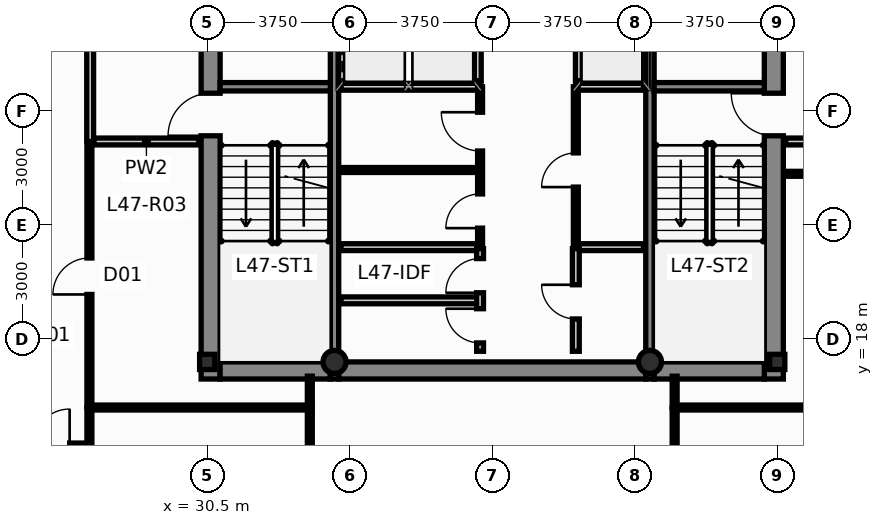
"""IFC4 building model, lengths in metres.
Left out: names, types, materials, properties, quantities, classifications, styles, units other than length and angle.
Written with IfcOpenShell. Run it as: python <this file> out.ifc"""

import sys

from ifc_helpers import new_model, si_unit, direction, frame, frame_2d, origin, origin_2d, place, context, subcontext, project, spatial, rectangle, hollow_circle, i_section, extrude, source, transform, mapped, element, fill, save


model = new_model("IFC4")
c1 = context("Model", 3, precision=1e-05, world=origin(), true_north=direction((0.0, 1.0)))
c2 = subcontext(c1, "Body", "Model", "MODEL_VIEW")
j1 = project(units=[si_unit("LENGTHUNIT", "METRE"), si_unit("PLANEANGLEUNIT", "RADIAN")], contexts=[c1])
p1 = place(None, origin())
s1 = spatial("IfcSite", under=j1, at=p1, CompositionType="ELEMENT")
p2 = place(p1, origin())
s2 = spatial("IfcBuilding", under=s1, at=p2, CompositionType="ELEMENT")
p3 = place(p2, frame((0.0, 0.0, 180.4)))
s3 = spatial("IfcBuildingStorey", under=s2, at=p3, CompositionType="ELEMENT", Elevation=180.4)
m1 = source(origin(), c2, "Body", "SweptSolid", [
    extrude(i_section(OverallWidth=0.4, OverallDepth=0.4, WebThickness=0.02, FlangeThickness=0.032, at=origin_2d()), origin(), (0.0, 0.0, 1.0), 3.65),
])
for number, where, z_axis, x_axis in (
    (1, (30.5, 17.4, 0.0), (0.0, 0.0, 1.0), (1.0, 0.0, 0.0)),
    (2, (45.5, 17.4, 0.0), (0.0, 0.0, 1.0), (1.0, 0.0, 0.0)),
):
    element("IfcColumn", number, at=place(p3, frame(where, z_axis=z_axis, x_axis=x_axis)), inside=s3, PredefinedType="COLUMN", context=c2, shape_type="MappedRepresentation", body=[
        mapped(m1, transform((0.0, 0.0, 0.0), scale=1.0)),
    ])
m2 = source(origin(), c2, "Body", "SweptSolid", [
    extrude(hollow_circle(Radius=0.305, WallThickness=0.025, at=origin_2d()), origin(), (0.0, 0.0, 1.0), 3.65),
])
for number, where, z_axis, x_axis in (
    (3, (33.85, 17.4, 0.0), (0.0, 0.0, 1.0), (1.0, 0.0, 0.0)),
    (4, (42.15, 17.4, 0.0), (0.0, 0.0, 1.0), (1.0, 0.0, 0.0)),
):
    element("IfcColumn", number, at=place(p3, frame(where, z_axis=z_axis, x_axis=x_axis)), inside=s3, PredefinedType="COLUMN", context=c2, shape_type="MappedRepresentation", body=[
        mapped(m2, transform((0.0, 0.0, 0.0), scale=1.0)),
    ])
p4 = place(p3, frame((30.59, 16.95, 0.0), z_axis=(0.0, 0.0, 1.0), x_axis=(0.0, 1.0, 0.0)))
e5 = element("IfcWall", 5, at=p4, inside=s3, PredefinedType="SHEAR", context=c2, shape_type="SweptSolid", body=[
    extrude(rectangle(XDim=13.275, YDim=0.5, at=frame_2d((6.638, 0.0))), origin(), (0.0, 0.0, 1.0), 3.65),
])
p5 = place(p4, frame((6.4, 0.0, 0.0)))
e6 = element("IfcOpeningElement", 6, at=p5, cuts=e5, PredefinedType="OPENING", context=c2, shape_type="SweptSolid", body=[
    extrude(rectangle(XDim=1.12, YDim=2.15, at=frame_2d((0.56, 1.075))), frame((0.0, 0.262, 0.0), z_axis=(0.0, -1.0, 0.0), x_axis=(1.0, 0.0, 0.0)), (0.0, 0.0, 1.0), 0.524),
])
p6 = place(p4, frame((10.85, 0.0, 0.0)))
e7 = element("IfcOpeningElement", 7, at=p6, cuts=e5, PredefinedType="OPENING", context=c2, shape_type="SweptSolid", body=[
    extrude(rectangle(XDim=1.2, YDim=2.2, at=frame_2d((0.6, 1.1))), frame((0.0, 0.262, 0.0), z_axis=(0.0, -1.0, 0.0), x_axis=(1.0, 0.0, 0.0)), (0.0, 0.0, 1.0), 0.524),
])
p7 = place(p3, frame((45.41, 16.95, 0.0), z_axis=(0.0, 0.0, 1.0), x_axis=(0.0, 1.0, 0.0)))
e8 = element("IfcWall", 8, at=p7, inside=s3, PredefinedType="SHEAR", context=c2, shape_type="SweptSolid", body=[
    extrude(rectangle(XDim=13.275, YDim=0.5, at=frame_2d((6.638, 0.0))), origin(), (0.0, 0.0, 1.0), 3.65),
])
p8 = place(p7, frame((6.4, 0.0, 0.0)))
e9 = element("IfcOpeningElement", 9, at=p8, cuts=e8, PredefinedType="OPENING", context=c2, shape_type="SweptSolid", body=[
    extrude(rectangle(XDim=1.12, YDim=2.15, at=frame_2d((0.56, 1.075))), frame((0.0, 0.262, 0.0), z_axis=(0.0, -1.0, 0.0), x_axis=(1.0, 0.0, 0.0)), (0.0, 0.0, 1.0), 0.524),
])
p9 = place(p7, frame((10.85, 0.0, 0.0)))
e10 = element("IfcOpeningElement", 10, at=p9, cuts=e8, PredefinedType="OPENING", context=c2, shape_type="SweptSolid", body=[
    extrude(rectangle(XDim=1.2, YDim=2.2, at=frame_2d((0.6, 1.1))), frame((0.0, 0.262, 0.0), z_axis=(0.0, -1.0, 0.0), x_axis=(1.0, 0.0, 0.0)), (0.0, 0.0, 1.0), 0.524),
])
p10 = place(p3, frame((30.84, 17.175, 0.0), z_axis=(0.0, 0.0, 1.0), x_axis=(1.0, 0.0, 0.0)))
e11 = element("IfcWall", 11, at=p10, inside=s3, PredefinedType="SHEAR", context=c2, shape_type="SweptSolid", body=[
    extrude(rectangle(XDim=2.9, YDim=0.45, at=frame_2d((1.45, 0.0))), origin(), (0.0, 0.0, 1.0), 3.65),
])
p11 = place(p3, frame((33.96, 17.175, 0.0), z_axis=(0.0, 0.0, 1.0), x_axis=(1.0, 0.0, 0.0)))
e12 = element("IfcWall", 12, at=p11, inside=s3, PredefinedType="SHEAR", context=c2, shape_type="SweptSolid", body=[
    extrude(rectangle(XDim=8.08, YDim=0.45, at=frame_2d((4.04, 0.0))), origin(), (0.0, 0.0, 1.0), 3.65),
])
p12 = place(p3, frame((42.26, 17.175, 0.0), z_axis=(0.0, 0.0, 1.0), x_axis=(1.0, 0.0, 0.0)))
e13 = element("IfcWall", 13, at=p12, inside=s3, PredefinedType="SHEAR", context=c2, shape_type="SweptSolid", body=[
    extrude(rectangle(XDim=2.9, YDim=0.45, at=frame_2d((1.45, 0.0))), origin(), (0.0, 0.0, 1.0), 3.65),
])
for number, where, z_axis, x_axis in (
    (14, (33.85, 16.95, 0.0), (0.0, 0.0, 1.0), (0.0, 1.0, 0.0)),
    (15, (42.15, 16.95, 0.0), (0.0, 0.0, 1.0), (0.0, 1.0, 0.0)),
):
    element("IfcWall", number, at=place(p3, frame(where, z_axis=z_axis, x_axis=x_axis)), inside=s3, PredefinedType="SHEAR", context=c2, shape_type="SweptSolid", body=[
        extrude(rectangle(XDim=13.275, YDim=0.22, at=frame_2d((6.638, 0.0))), origin(), (0.0, 0.0, 1.0), 3.65),
    ])
for number, where, z_axis, x_axis in (
    (16, (30.84, 24.64, 0.0), (0.0, 0.0, 1.0), (1.0, 0.0, 0.0)),
    (17, (42.26, 24.64, 0.0), (0.0, 0.0, 1.0), (1.0, 0.0, 0.0)),
):
    element("IfcWall", number, at=place(p3, frame(where, z_axis=z_axis, x_axis=x_axis)), inside=s3, PredefinedType="SHEAR", context=c2, shape_type="SweptSolid", body=[
        extrude(rectangle(XDim=2.9, YDim=0.22, at=frame_2d((1.45, 0.0))), origin(), (0.0, 0.0, 1.0), 3.65),
    ])
for number, where, z_axis, x_axis in (
    (18, (37.62, 24.8, 0.0), (0.0, 0.0, 1.0), (0.0, 1.0, 0.0)),
    (19, (40.28, 24.8, 0.0), (0.0, 0.0, 1.0), (0.0, 1.0, 0.0)),
):
    element("IfcWall", number, at=place(p3, frame(where, z_axis=z_axis, x_axis=x_axis)), inside=s3, PredefinedType="PARTITIONING", context=c2, shape_type="SweptSolid", body=[
        extrude(rectangle(XDim=2.0, YDim=0.18, at=frame_2d((1.0, 0.0))), origin(), (0.0, 0.0, 1.0), 3.4),
    ])
p13 = place(p3, frame((34.02, 24.64, 0.0), z_axis=(0.0, 0.0, 1.0), x_axis=(1.0, 0.0, 0.0)))
e20 = element("IfcWall", 20, at=p13, inside=s3, PredefinedType="PARTITIONING", context=c2, shape_type="SweptSolid", body=[
    extrude(rectangle(XDim=3.68, YDim=0.18, at=frame_2d((1.84, 0.0))), origin(), (0.0, 0.0, 1.0), 3.4),
])
p14 = place(p3, frame((40.2, 24.64, 0.0), z_axis=(0.0, 0.0, 1.0), x_axis=(1.0, 0.0, 0.0)))
e21 = element("IfcWall", 21, at=p14, inside=s3, PredefinedType="PARTITIONING", context=c2, shape_type="SweptSolid", body=[
    extrude(rectangle(XDim=1.78, YDim=0.18, at=frame_2d((0.89, 0.0))), origin(), (0.0, 0.0, 1.0), 3.4),
])
p15 = place(p3, frame((27.42, 23.2, 0.0), z_axis=(0.0, 0.0, 1.0), x_axis=(0.0, 1.0, 0.0)))
e22 = element("IfcWall", 22, at=p15, inside=s3, PredefinedType="PARTITIONING", context=c2, shape_type="SweptSolid", body=[
    extrude(rectangle(XDim=6.4, YDim=0.18, at=frame_2d((3.2, 0.0))), origin(), (0.0, 0.0, 1.0), 3.078),
])
p16 = place(p15, frame((2.65, 0.0, 0.0)))
e23 = element("IfcOpeningElement", 23, at=p16, cuts=e22, PredefinedType="OPENING", context=c2, shape_type="SweptSolid", body=[
    extrude(rectangle(XDim=1.05, YDim=2.15, at=frame_2d((0.525, 1.075))), frame((0.0, 0.102, 0.0), z_axis=(0.0, -1.0, 0.0), x_axis=(1.0, 0.0, 0.0)), (0.0, 0.0, 1.0), 0.204),
])
for number, where, z_axis, x_axis in (
    (24, (27.52, 23.2, 0.0), (0.0, 0.0, 1.0), (1.0, 0.0, 0.0)),
    (25, (45.72, 23.2, 0.0), (0.0, 0.0, 1.0), (1.0, 0.0, 0.0)),
):
    element("IfcWall", number, at=place(p3, frame(where, z_axis=z_axis, x_axis=x_axis)), inside=s3, PredefinedType="PARTITIONING", context=c2, shape_type="SweptSolid", body=[
        extrude(rectangle(XDim=2.76, YDim=0.18, at=frame_2d((1.38, 0.0))), origin(), (0.0, 0.0, 1.0), 3.4),
    ])
p17 = place(p3, frame((34.02, 20.42, 0.0), z_axis=(0.0, 0.0, 1.0), x_axis=(1.0, 0.0, 0.0)))
e26 = element("IfcWall", 26, at=p17, inside=s3, PredefinedType="PARTITIONING", context=c2, shape_type="SweptSolid", body=[
    extrude(rectangle(XDim=3.64, YDim=0.18, at=frame_2d((1.82, 0.0))), origin(), (0.0, 0.0, 1.0), 3.4),
])
p18 = place(p3, frame((40.22, 20.42, 0.0), z_axis=(0.0, 0.0, 1.0), x_axis=(1.0, 0.0, 0.0)))
e27 = element("IfcWall", 27, at=p18, inside=s3, PredefinedType="PARTITIONING", context=c2, shape_type="SweptSolid", body=[
    extrude(rectangle(XDim=1.76, YDim=0.18, at=frame_2d((0.88, 0.0))), origin(), (0.0, 0.0, 1.0), 3.4),
])
p19 = place(p3, frame((34.02, 22.45, 0.0), z_axis=(0.0, 0.0, 1.0), x_axis=(1.0, 0.0, 0.0)))
e28 = element("IfcWall", 28, at=p19, inside=s3, PredefinedType="PARTITIONING", context=c2, shape_type="SweptSolid", body=[
    extrude(rectangle(XDim=3.58, YDim=0.13, at=frame_2d((1.79, 0.0))), origin(), (0.0, 0.0, 1.0), 3.4),
])
p20 = place(p3, frame((37.68, 20.5, 0.0), z_axis=(0.0, 0.0, 1.0), x_axis=(0.0, 1.0, 0.0)))
e29 = element("IfcWall", 29, at=p20, inside=s3, PredefinedType="PARTITIONING", context=c2, shape_type="SweptSolid", body=[
    extrude(rectangle(XDim=4.14, YDim=0.13, at=frame_2d((2.07, 0.0))), origin(), (0.0, 0.0, 1.0), 3.4),
])
p21 = place(p20, frame((0.42, 0.0, 0.0)))
e30 = element("IfcOpeningElement", 30, at=p21, cuts=e29, PredefinedType="OPENING", context=c2, shape_type="SweptSolid", body=[
    extrude(rectangle(XDim=0.9, YDim=2.1, at=frame_2d((0.45, 1.05))), frame((0.0, 0.077, 0.0), z_axis=(0.0, -1.0, 0.0), x_axis=(1.0, 0.0, 0.0)), (0.0, 0.0, 1.0), 0.154),
])
p22 = place(p20, frame((2.45, 0.0, 0.0)))
e31 = element("IfcOpeningElement", 31, at=p22, cuts=e29, PredefinedType="OPENING", context=c2, shape_type="SweptSolid", body=[
    extrude(rectangle(XDim=1.02, YDim=2.15, at=frame_2d((0.51, 1.075))), frame((0.0, 0.077, 0.0), z_axis=(0.0, -1.0, 0.0), x_axis=(1.0, 0.0, 0.0)), (0.0, 0.0, 1.0), 0.154),
])
p23 = place(p3, frame((40.2, 20.5, 0.0), z_axis=(0.0, 0.0, 1.0), x_axis=(0.0, 1.0, 0.0)))
e32 = element("IfcWall", 32, at=p23, inside=s3, PredefinedType="PARTITIONING", context=c2, shape_type="SweptSolid", body=[
    extrude(rectangle(XDim=4.14, YDim=0.13, at=frame_2d((2.07, 0.0))), origin(), (0.0, 0.0, 1.0), 3.4),
])
p24 = place(p23, frame((1.5, 0.0, 0.0)))
e33 = element("IfcOpeningElement", 33, at=p24, cuts=e32, PredefinedType="OPENING", context=c2, shape_type="SweptSolid", body=[
    extrude(rectangle(XDim=0.9, YDim=2.1, at=frame_2d((0.45, 1.05))), frame((0.0, 0.077, 0.0), z_axis=(0.0, -1.0, 0.0), x_axis=(1.0, 0.0, 0.0)), (0.0, 0.0, 1.0), 0.154),
])
p25 = place(p3, frame((34.02, 19.02, 0.0), z_axis=(0.0, 0.0, 1.0), x_axis=(1.0, 0.0, 0.0)))
e34 = element("IfcWall", 34, at=p25, inside=s3, PredefinedType="PARTITIONING", context=c2, shape_type="SweptSolid", body=[
    extrude(rectangle(XDim=3.58, YDim=0.18, at=frame_2d((1.79, 0.0))), origin(), (0.0, 0.0, 1.0), 3.4),
])
p26 = place(p3, frame((37.68, 17.68, 0.0), z_axis=(0.0, 0.0, 1.0), x_axis=(0.0, 1.0, 0.0)))
e35 = element("IfcWall", 35, at=p26, inside=s3, PredefinedType="PARTITIONING", context=c2, shape_type="SweptSolid", body=[
    extrude(rectangle(XDim=2.7, YDim=0.18, at=frame_2d((1.35, 0.0))), origin(), (0.0, 0.0, 1.0), 3.4),
])
p27 = place(p26, frame((0.22, 0.0, 0.0)))
e36 = element("IfcOpeningElement", 36, at=p27, cuts=e35, PredefinedType="OPENING", context=c2, shape_type="SweptSolid", body=[
    extrude(rectangle(XDim=0.9, YDim=2.1, at=frame_2d((0.45, 1.05))), frame((0.0, 0.102, 0.0), z_axis=(0.0, -1.0, 0.0), x_axis=(1.0, 0.0, 0.0)), (0.0, 0.0, 1.0), 0.204),
])
p28 = place(p26, frame((1.54, 0.0, 0.0)))
e37 = element("IfcOpeningElement", 37, at=p28, cuts=e35, PredefinedType="OPENING", context=c2, shape_type="SweptSolid", body=[
    extrude(rectangle(XDim=0.9, YDim=2.1, at=frame_2d((0.45, 1.05))), frame((0.0, 0.102, 0.0), z_axis=(0.0, -1.0, 0.0), x_axis=(1.0, 0.0, 0.0)), (0.0, 0.0, 1.0), 0.204),
])
p29 = place(p3, frame((40.2, 17.68, 0.0), z_axis=(0.0, 0.0, 1.0), x_axis=(0.0, 1.0, 0.0)))
e38 = element("IfcWall", 38, at=p29, inside=s3, PredefinedType="PARTITIONING", context=c2, shape_type="SweptSolid", body=[
    extrude(rectangle(XDim=2.7, YDim=0.18, at=frame_2d((1.35, 0.0))), origin(), (0.0, 0.0, 1.0), 3.4),
])
p30 = place(p29, frame((0.85, 0.0, 0.0)))
e39 = element("IfcOpeningElement", 39, at=p30, cuts=e38, PredefinedType="OPENING", context=c2, shape_type="SweptSolid", body=[
    extrude(rectangle(XDim=0.9, YDim=2.1, at=frame_2d((0.45, 1.05))), frame((0.0, 0.102, 0.0), z_axis=(0.0, -1.0, 0.0), x_axis=(1.0, 0.0, 0.0)), (0.0, 0.0, 1.0), 0.204),
])
p31 = place(p3, frame((42.805, 16.2, 0.0), z_axis=(0.0, 0.0, 1.0), x_axis=(1.0, 0.0, 0.0)))
e40 = element("IfcWall", 40, at=p31, inside=s3, PredefinedType="PARTITIONING", context=c2, shape_type="SweptSolid", body=[
    extrude(rectangle(XDim=9.69, YDim=0.13, at=frame_2d((4.845, 0.0))), origin(), (0.0, 0.0, 1.0), 3.078),
])
p32 = place(p31, frame((4.365, 0.0, 0.0)))
e41 = element("IfcOpeningElement", 41, at=p32, cuts=e40, PredefinedType="OPENING", context=c2, shape_type="SweptSolid", body=[
    extrude(rectangle(XDim=0.96, YDim=2.15, at=frame_2d((0.48, 1.075))), frame((0.0, 0.077, 0.0), z_axis=(0.0, -1.0, 0.0), x_axis=(1.0, 0.0, 0.0)), (0.0, 0.0, 1.0), 0.154),
])
p33 = place(p3, frame((27.4, 16.205, 0.0), z_axis=(0.0, 0.0, 1.0), x_axis=(0.0, 1.0, 0.0)))
e42 = element("IfcWall", 42, at=p33, inside=s3, PredefinedType="PARTITIONING", context=c2, shape_type="SweptSolid", body=[
    extrude(rectangle(XDim=6.9, YDim=0.13, at=frame_2d((3.45, 0.0))), origin(), (0.0, 0.0, 1.0), 3.078),
])
p34 = place(p33, frame((2.97, 0.0, 0.0)))
e43 = element("IfcOpeningElement", 43, at=p34, cuts=e42, PredefinedType="OPENING", context=c2, shape_type="SweptSolid", body=[
    extrude(rectangle(XDim=0.96, YDim=2.15, at=frame_2d((0.48, 1.075))), frame((0.0, 0.077, 0.0), z_axis=(0.0, -1.0, 0.0), x_axis=(1.0, 0.0, 0.0)), (0.0, 0.0, 1.0), 0.154),
])
p35 = place(p3, frame((45.675, 22.35, 0.0), z_axis=(0.0, 0.0, 1.0), x_axis=(1.0, 0.0, 0.0)))
e44 = element("IfcWall", 44, at=p35, inside=s3, PredefinedType="PARTITIONING", context=c2, shape_type="SweptSolid", body=[
    extrude(rectangle(XDim=6.82, YDim=0.13, at=frame_2d((3.41, 0.0))), origin(), (0.0, 0.0, 1.0), 3.4),
])
p36 = place(p3, frame((27.405, 16.2, 0.0), z_axis=(0.0, 0.0, 1.0), x_axis=(1.0, 0.0, 0.0)))
e45 = element("IfcWall", 45, at=p36, inside=s3, PredefinedType="PARTITIONING", context=c2, shape_type="SweptSolid", body=[
    extrude(rectangle(XDim=5.79, YDim=0.13, at=frame_2d((2.895, 0.0))), origin(), (0.0, 0.0, 1.0), 3.078),
])
for number, where, z_axis, x_axis in (
    (46, (33.2, 11.255, 0.0), (0.0, 0.0, 1.0), (0.0, 1.0, 0.0)),
    (47, (42.8, 11.255, 0.0), (0.0, 0.0, 1.0), (0.0, 1.0, 0.0)),
):
    element("IfcWall", number, at=place(p3, frame(where, z_axis=z_axis, x_axis=x_axis)), inside=s3, PredefinedType="PARTITIONING", context=c2, shape_type="SweptSolid", body=[
        extrude(rectangle(XDim=4.94, YDim=0.13, at=frame_2d((2.47, 0.0))), origin(), (0.0, 0.0, 1.0), 3.4),
    ])
p37 = place(p3, frame((25.405, 15.2, 0.0), z_axis=(0.0, 0.0, 1.0), x_axis=(1.0, 0.0, 0.0)))
e48 = element("IfcWall", 48, at=p37, inside=s3, PredefinedType="PARTITIONING", context=c2, shape_type="SweptSolid", body=[
    extrude(rectangle(XDim=1.99, YDim=0.13, at=frame_2d((0.995, 0.0))), origin(), (0.0, 0.0, 1.0), 3.4),
])
p38 = place(p37, frame((0.515, 0.0, 0.0)))
e49 = element("IfcOpeningElement", 49, at=p38, cuts=e48, PredefinedType="OPENING", context=c2, shape_type="SweptSolid", body=[
    extrude(rectangle(XDim=0.96, YDim=2.15, at=frame_2d((0.48, 1.075))), frame((0.0, 0.077, 0.0), z_axis=(0.0, -1.0, 0.0), x_axis=(1.0, 0.0, 0.0)), (0.0, 0.0, 1.0), 0.154),
])
p39 = place(p3, frame((27.4, 15.205, 0.0), z_axis=(0.0, 0.0, 1.0), x_axis=(0.0, 1.0, 0.0)))
e50 = element("IfcWall", 50, at=p39, inside=s3, PredefinedType="PARTITIONING", context=c2, shape_type="SweptSolid", body=[
    extrude(rectangle(XDim=0.99, YDim=0.13, at=frame_2d((0.495, 0.0))), origin(), (0.0, 0.0, 1.0), 3.4),
])
for number, where, z_axis, x_axis in (
    (51, (33.2, 16.205, 0.0), (0.0, 0.0, 1.0), (0.0, 1.0, 0.0)),
    (52, (42.8, 16.205, 0.0), (0.0, 0.0, 1.0), (0.0, 1.0, 0.0)),
):
    element("IfcWall", number, at=place(p3, frame(where, z_axis=z_axis, x_axis=x_axis)), inside=s3, PredefinedType="PARTITIONING", context=c2, shape_type="SweptSolid", body=[
        extrude(rectangle(XDim=0.82, YDim=0.13, at=frame_2d((0.41, 0.0))), origin(), (0.0, 0.0, 1.0), 3.4),
    ])
p40 = place(p5, origin())
e53 = element("IfcDoor", 53, at=p40, inside=s3, OperationType="SINGLE_SWING_LEFT", PredefinedType="DOOR", context=c2, shape_type="SweptSolid", body=[
    extrude(rectangle(XDim=1.12, YDim=2.15, at=frame_2d((0.56, 1.075))), frame((0.0, 0.025, 0.0), z_axis=(0.0, -1.0, 0.0), x_axis=(1.0, 0.0, 0.0)), (0.0, 0.0, 1.0), 0.05),
])
fill(e6, e53)
p41 = place(p8, origin())
e54 = element("IfcDoor", 54, at=p41, inside=s3, OperationType="SINGLE_SWING_RIGHT", PredefinedType="DOOR", context=c2, shape_type="SweptSolid", body=[
    extrude(rectangle(XDim=1.12, YDim=2.15, at=frame_2d((0.56, 1.075))), frame((0.0, 0.025, 0.0), z_axis=(0.0, -1.0, 0.0), x_axis=(1.0, 0.0, 0.0)), (0.0, 0.0, 1.0), 0.05),
])
fill(e9, e54)
p42 = place(p21, origin())
e55 = element("IfcDoor", 55, at=p42, inside=s3, OperationType="SINGLE_SWING_LEFT", PredefinedType="DOOR", context=c2, shape_type="SweptSolid", body=[
    extrude(rectangle(XDim=0.9, YDim=2.1, at=frame_2d((0.45, 1.05))), frame((0.0, 0.025, 0.0), z_axis=(0.0, -1.0, 0.0), x_axis=(1.0, 0.0, 0.0)), (0.0, 0.0, 1.0), 0.05),
])
fill(e30, e55)
p43 = place(p22, origin())
e56 = element("IfcDoor", 56, at=p43, inside=s3, OperationType="SINGLE_SWING_RIGHT", PredefinedType="DOOR", context=c2, shape_type="SweptSolid", body=[
    extrude(rectangle(XDim=1.02, YDim=2.15, at=frame_2d((0.51, 1.075))), frame((0.0, 0.025, 0.0), z_axis=(0.0, -1.0, 0.0), x_axis=(1.0, 0.0, 0.0)), (0.0, 0.0, 1.0), 0.05),
])
fill(e31, e56)
p44 = place(p24, origin())
e57 = element("IfcDoor", 57, at=p44, inside=s3, OperationType="SINGLE_SWING_LEFT", PredefinedType="DOOR", context=c2, shape_type="SweptSolid", body=[
    extrude(rectangle(XDim=0.9, YDim=2.1, at=frame_2d((0.45, 1.05))), frame((0.0, 0.025, 0.0), z_axis=(0.0, -1.0, 0.0), x_axis=(1.0, 0.0, 0.0)), (0.0, 0.0, 1.0), 0.05),
])
fill(e33, e57)
p45 = place(p27, origin())
e58 = element("IfcDoor", 58, at=p45, inside=s3, OperationType="SINGLE_SWING_RIGHT", PredefinedType="DOOR", context=c2, shape_type="SweptSolid", body=[
    extrude(rectangle(XDim=0.9, YDim=2.1, at=frame_2d((0.45, 1.05))), frame((0.0, 0.025, 0.0), z_axis=(0.0, -1.0, 0.0), x_axis=(1.0, 0.0, 0.0)), (0.0, 0.0, 1.0), 0.05),
])
fill(e36, e58)
p46 = place(p28, origin())
e59 = element("IfcDoor", 59, at=p46, inside=s3, OperationType="SINGLE_SWING_LEFT", PredefinedType="DOOR", context=c2, shape_type="SweptSolid", body=[
    extrude(rectangle(XDim=0.9, YDim=2.1, at=frame_2d((0.45, 1.05))), frame((0.0, 0.025, 0.0), z_axis=(0.0, -1.0, 0.0), x_axis=(1.0, 0.0, 0.0)), (0.0, 0.0, 1.0), 0.05),
])
fill(e37, e59)
p47 = place(p30, origin())
e60 = element("IfcDoor", 60, at=p47, inside=s3, OperationType="SINGLE_SWING_RIGHT", PredefinedType="DOOR", context=c2, shape_type="SweptSolid", body=[
    extrude(rectangle(XDim=0.9, YDim=2.1, at=frame_2d((0.45, 1.05))), frame((0.0, 0.025, 0.0), z_axis=(0.0, -1.0, 0.0), x_axis=(1.0, 0.0, 0.0)), (0.0, 0.0, 1.0), 0.05),
])
fill(e39, e60)
p48 = place(p34, origin())
e61 = element("IfcDoor", 61, at=p48, inside=s3, OperationType="SINGLE_SWING_LEFT", PredefinedType="DOOR", context=c2, shape_type="SweptSolid", body=[
    extrude(rectangle(XDim=0.96, YDim=2.15, at=frame_2d((0.48, 1.075))), frame((0.0, 0.025, 0.0), z_axis=(0.0, -1.0, 0.0), x_axis=(1.0, 0.0, 0.0)), (0.0, 0.0, 1.0), 0.05),
])
fill(e43, e61)
p49 = place(p38, origin())
e62 = element("IfcDoor", 62, at=p49, inside=s3, OperationType="SINGLE_SWING_RIGHT", PredefinedType="DOOR", context=c2, shape_type="SweptSolid", body=[
    extrude(rectangle(XDim=0.96, YDim=2.15, at=frame_2d((0.48, 1.075))), frame((0.0, 0.025, 0.0), z_axis=(0.0, -1.0, 0.0), x_axis=(1.0, 0.0, 0.0)), (0.0, 0.0, 1.0), 0.05),
])
fill(e49, e62)
save(model, sys.argv[1])
